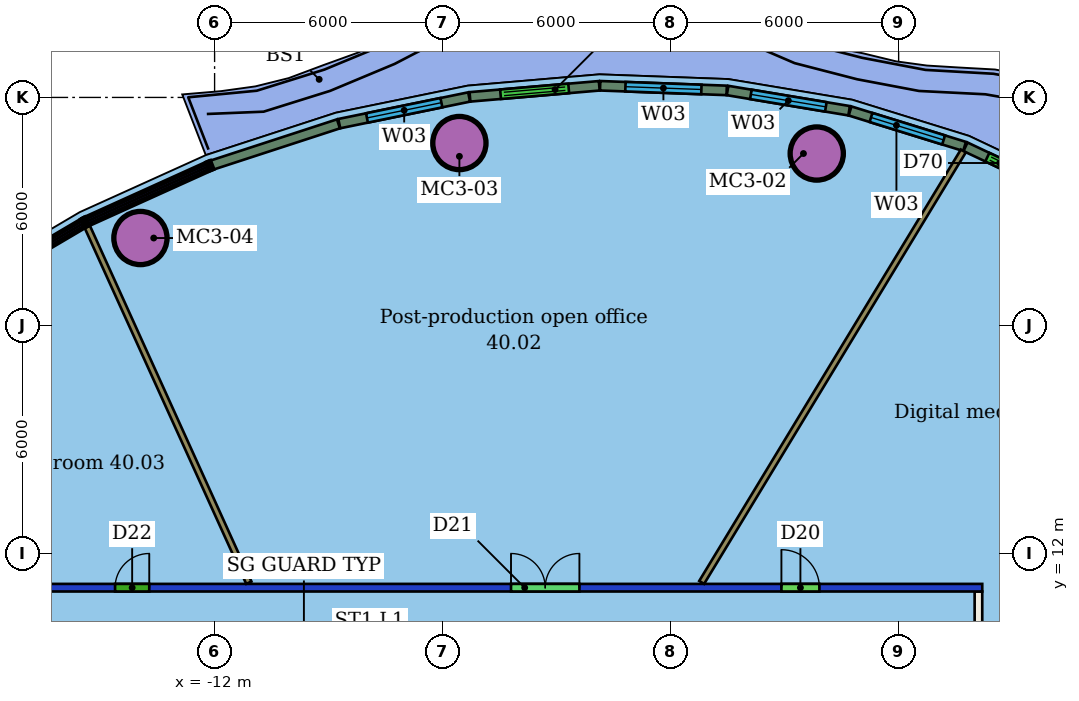
"""IFC4 building model, lengths in metres.
Left out: names, types, materials, properties, quantities, classifications, styles, units other than length and angle.
Written with IfcOpenShell. Run it as: python <this file> out.ifc"""

import sys

from ifc_helpers import new_model, si_unit, direction, frame, frame_2d, origin, origin_2d, place, context, subcontext, project, spatial, rectangle, hollow_circle, extrude, element, fill, save


model = new_model("IFC4")
c1 = context("Model", 3, precision=1e-05, world=origin(), true_north=direction((0.0, 1.0)))
c2 = subcontext(c1, "Body", "Model", "MODEL_VIEW")
j1 = project(units=[si_unit("LENGTHUNIT", "METRE"), si_unit("PLANEANGLEUNIT", "RADIAN")], contexts=[c1])
p1 = place(None, origin())
s1 = spatial("IfcSite", under=j1, at=p1, CompositionType="ELEMENT")
p2 = place(p1, origin())
s2 = spatial("IfcBuilding", under=s1, at=p2, CompositionType="ELEMENT")
p3 = place(p2, frame((0.0, 0.0, 168.6)))
s3 = spatial("IfcBuildingStorey", under=s2, at=p3, CompositionType="ELEMENT", Elevation=168.6)
for number, where, z_axis, x_axis in (
    (1, (3.845, 22.524, 0.0), (0.0, 0.0, 1.0), (1.0, 0.0, 0.0)),
    (2, (-5.558, 22.8, 0.0), (0.0, 0.0, 1.0), (1.0, 0.0, 0.0)),
    (3, (-13.952, 20.301, 0.0), (0.0, 0.0, 1.0), (1.0, 0.0, 0.0)),
):
    element("IfcColumn", number, at=place(p3, frame(where, z_axis=z_axis, x_axis=x_axis)), inside=s3, PredefinedType="COLUMN", context=c2, shape_type="SweptSolid", body=[
        extrude(hollow_circle(Radius=0.7, WallThickness=0.05, at=origin_2d()), origin(), (0.0, 0.0, 1.0), 3.45),
    ])
p4 = place(p3, frame((-20.2, 11.1, 0.0), z_axis=(0.0, 0.0, 1.0), x_axis=(1.0, 0.0, 0.0)))
e4 = element("IfcWall", 4, at=p4, inside=s3, PredefinedType="PARTITIONING", context=c2, shape_type="SweptSolid", body=[
    extrude(rectangle(XDim=28.4, YDim=0.2, at=frame_2d((14.2, 0.0))), origin(), (0.0, 0.0, 1.0), 3.05),
])
p5 = place(p4, frame((23.115, 0.0, 0.0)))
e5 = element("IfcOpeningElement", 5, at=p5, cuts=e4, PredefinedType="OPENING", context=c2, shape_type="SweptSolid", body=[
    extrude(rectangle(XDim=1.0, YDim=2.1, at=frame_2d((0.5, 1.05))), frame((0.0, 0.11, 0.0), z_axis=(0.0, -1.0, 0.0), x_axis=(1.0, 0.0, 0.0)), (0.0, 0.0, 1.0), 0.22),
])
p6 = place(p4, frame((16.0, 0.0, 0.0)))
e6 = element("IfcOpeningElement", 6, at=p6, cuts=e4, PredefinedType="OPENING", context=c2, shape_type="SweptSolid", body=[
    extrude(rectangle(XDim=1.8, YDim=2.1, at=frame_2d((0.9, 1.05))), frame((0.0, 0.11, 0.0), z_axis=(0.0, -1.0, 0.0), x_axis=(1.0, 0.0, 0.0)), (0.0, 0.0, 1.0), 0.22),
])
p7 = place(p4, frame((5.581, 0.0, 0.0)))
e7 = element("IfcOpeningElement", 7, at=p7, cuts=e4, PredefinedType="OPENING", context=c2, shape_type="SweptSolid", body=[
    extrude(rectangle(XDim=0.9, YDim=2.1, at=frame_2d((0.45, 1.05))), frame((0.0, 0.11, 0.0), z_axis=(0.0, -1.0, 0.0), x_axis=(1.0, 0.0, 0.0)), (0.0, 0.0, 1.0), 0.22),
])
p8 = place(p3, frame((8.1, 11.0, 0.0), z_axis=(0.0, 0.0, 1.0), x_axis=(0.0, -1.0, 0.0)))
e8 = element("IfcWall", 8, at=p8, inside=s3, PredefinedType="PARTITIONING", context=c2, shape_type="SweptSolid", body=[
    extrude(rectangle(XDim=22.0, YDim=0.2, at=frame_2d((11.0, 0.0))), origin(), (0.0, 0.0, 1.0), 3.45),
])
p9 = place(p8, frame((12.716, 0.0, 0.0)))
e9 = element("IfcOpeningElement", 9, at=p9, cuts=e8, PredefinedType="OPENING", context=c2, shape_type="SweptSolid", body=[
    extrude(rectangle(XDim=1.2, YDim=2.1, at=frame_2d((0.6, 1.05))), frame((0.0, 0.11, 0.0), z_axis=(0.0, -1.0, 0.0), x_axis=(1.0, 0.0, 0.0)), (0.0, 0.0, 1.0), 0.22),
])
p10 = place(p8, frame((5.725, 0.0, 0.0)))
e10 = element("IfcOpeningElement", 10, at=p10, cuts=e8, PredefinedType="OPENING", context=c2, shape_type="SweptSolid", body=[
    extrude(rectangle(XDim=1.1, YDim=2.1, at=frame_2d((0.55, 1.05))), frame((0.0, 0.11, 0.0), z_axis=(0.0, -1.0, 0.0), x_axis=(1.0, 0.0, 0.0)), (0.0, 0.0, 1.0), 0.22),
])
p11 = place(p3, frame((16.98, 15.268, 0.0), z_axis=(0.0, 0.0, 1.0), x_axis=(-0.832919781607, -0.553393745363, 0.0)))
e11 = element("IfcWall", 11, at=p11, inside=s3, PredefinedType="PARTITIONING", context=c2, shape_type="SweptSolid", body=[
    extrude(rectangle(XDim=10.442, YDim=0.3, at=frame_2d((5.221, 0.0))), origin(), (0.0, 0.0, 1.0), 3.45),
])
p12 = place(p3, frame((7.702, 22.59, 0.0), z_axis=(0.0, 0.0, 1.0), x_axis=(-0.518600423231, -0.855016725582, 0.0)))
e12 = element("IfcWall", 12, at=p12, inside=s3, PredefinedType="PARTITIONING", context=c2, shape_type="SweptSolid", body=[
    extrude(rectangle(XDim=13.276, YDim=0.15, at=frame_2d((6.638, 0.0))), origin(), (0.0, 0.0, 1.0), 3.45),
])
p13 = place(p3, frame((-15.354, 20.604, 0.0), z_axis=(0.0, 0.0, 1.0), x_axis=(0.413381174211, -0.910558073276, 0.0)))
e13 = element("IfcWall", 13, at=p13, inside=s3, PredefinedType="PARTITIONING", context=c2, shape_type="SweptSolid", body=[
    extrude(rectangle(XDim=10.293, YDim=0.15, at=frame_2d((5.147, 0.0))), origin(), (0.0, 0.0, 1.0), 3.45),
])
p14 = place(p3, frame((10.536, 21.385, 0.0), z_axis=(0.0, 0.0, 1.0), x_axis=(-0.903619724227, 0.428335609058, 0.0)))
e14 = element("IfcWall", 14, at=p14, inside=s3, PredefinedType="SOLIDWALL", context=c2, shape_type="SweptSolid", body=[
    extrude(rectangle(XDim=3.073, YDim=0.25, at=frame_2d((1.537, 0.0))), origin(), (0.0, 0.0, 1.0), 3.1),
])
p15 = place(p14, frame((0.637, 0.0, 0.0)))
e15 = element("IfcOpeningElement", 15, at=p15, cuts=e14, PredefinedType="OPENING", context=c2, shape_type="SweptSolid", body=[
    extrude(rectangle(XDim=1.8, YDim=2.4, at=frame_2d((0.9, 1.2))), frame((0.0, 0.135, 0.0), z_axis=(0.0, -1.0, 0.0), x_axis=(1.0, 0.0, 0.0)), (0.0, 0.0, 1.0), 0.27),
])
p16 = place(p3, frame((7.735, 22.711, 0.0), z_axis=(0.0, 0.0, 1.0), x_axis=(-0.955252052872, 0.295793028119, 0.0)))
e16 = element("IfcWall", 16, at=p16, inside=s3, PredefinedType="SOLIDWALL", context=c2, shape_type="SweptSolid", body=[
    extrude(rectangle(XDim=3.155, YDim=0.25, at=frame_2d((1.577, 0.0))), origin(), (0.0, 0.0, 1.0), 3.1),
])
p17 = place(p16, frame((0.577, 0.0, 0.9)))
e17 = element("IfcOpeningElement", 17, at=p17, cuts=e16, PredefinedType="OPENING", context=c2, shape_type="SweptSolid", body=[
    extrude(rectangle(XDim=2.0, YDim=2.1, at=frame_2d((1.0, 1.05))), frame((0.0, 0.135, 0.0), z_axis=(0.0, -1.0, 0.0), x_axis=(1.0, 0.0, 0.0)), (0.0, 0.0, 1.0), 0.27),
])
p18 = place(p3, frame((4.697, 23.65, 0.0), z_axis=(0.0, 0.0, 1.0), x_axis=(-0.986414264197, 0.164276898525, 0.0)))
e18 = element("IfcWall", 18, at=p18, inside=s3, PredefinedType="SOLIDWALL", context=c2, shape_type="SweptSolid", body=[
    extrude(rectangle(XDim=3.243, YDim=0.25, at=frame_2d((1.621, 0.0))), origin(), (0.0, 0.0, 1.0), 3.1),
])
p19 = place(p18, frame((0.621, 0.0, 0.9)))
e19 = element("IfcOpeningElement", 19, at=p19, cuts=e18, PredefinedType="OPENING", context=c2, shape_type="SweptSolid", body=[
    extrude(rectangle(XDim=2.0, YDim=2.1, at=frame_2d((1.0, 1.05))), frame((0.0, 0.135, 0.0), z_axis=(0.0, -1.0, 0.0), x_axis=(1.0, 0.0, 0.0)), (0.0, 0.0, 1.0), 0.27),
])
p20 = place(p3, frame((1.475, 24.185, 0.0), z_axis=(0.0, 0.0, 1.0), x_axis=(-0.999325831556, 0.036713517754, 0.0)))
e20 = element("IfcWall", 20, at=p20, inside=s3, PredefinedType="SOLIDWALL", context=c2, shape_type="SweptSolid", body=[
    extrude(rectangle(XDim=3.332, YDim=0.25, at=frame_2d((1.666, 0.0))), origin(), (0.0, 0.0, 1.0), 3.1),
])
p21 = place(p20, frame((0.666, 0.0, 0.9)))
e21 = element("IfcOpeningElement", 21, at=p21, cuts=e20, PredefinedType="OPENING", context=c2, shape_type="SweptSolid", body=[
    extrude(rectangle(XDim=2.0, YDim=2.1, at=frame_2d((1.0, 1.05))), frame((0.0, 0.135, 0.0), z_axis=(0.0, -1.0, 0.0), x_axis=(1.0, 0.0, 0.0)), (0.0, 0.0, 1.0), 0.27),
])
p22 = place(p3, frame((-1.878, 24.306, 0.0), z_axis=(0.0, 0.0, 1.0), x_axis=(-0.996350297924, -0.085358560359, 0.0)))
e22 = element("IfcWall", 22, at=p22, inside=s3, PredefinedType="SOLIDWALL", context=c2, shape_type="SweptSolid", body=[
    extrude(rectangle(XDim=3.415, YDim=0.25, at=frame_2d((1.708, 0.0))), origin(), (0.0, 0.0, 1.0), 3.1),
])
p23 = place(p22, frame((0.807, 0.0, 0.0)))
e23 = element("IfcOpeningElement", 23, at=p23, cuts=e22, PredefinedType="OPENING", context=c2, shape_type="SweptSolid", body=[
    extrude(rectangle(XDim=1.8, YDim=2.4, at=frame_2d((0.9, 1.2))), frame((0.0, 0.135, 0.0), z_axis=(0.0, -1.0, 0.0), x_axis=(1.0, 0.0, 0.0)), (0.0, 0.0, 1.0), 0.27),
])
p24 = place(p3, frame((-5.303, 24.012, 0.0), z_axis=(0.0, 0.0, 1.0), x_axis=(-0.979588567623, -0.201013029881, 0.0)))
e24 = element("IfcWall", 24, at=p24, inside=s3, PredefinedType="SOLIDWALL", context=c2, shape_type="SweptSolid", body=[
    extrude(rectangle(XDim=3.488, YDim=0.25, at=frame_2d((1.744, 0.0))), origin(), (0.0, 0.0, 1.0), 3.1),
])
p25 = place(p24, frame((0.744, 0.0, 0.9)))
e25 = element("IfcOpeningElement", 25, at=p25, cuts=e24, PredefinedType="OPENING", context=c2, shape_type="SweptSolid", body=[
    extrude(rectangle(XDim=2.0, YDim=2.1, at=frame_2d((1.0, 1.05))), frame((0.0, 0.135, 0.0), z_axis=(0.0, -1.0, 0.0), x_axis=(1.0, 0.0, 0.0)), (0.0, 0.0, 1.0), 0.27),
])
p26 = place(p3, frame((-8.741, 23.305, 0.0), z_axis=(0.0, 0.0, 1.0), x_axis=(-0.950740111952, -0.309989095817, 0.0)))
e26 = element("IfcWall", 26, at=p26, inside=s3, PredefinedType="SOLIDWALL", context=c2, shape_type="SweptSolid", body=[
    extrude(rectangle(XDim=3.502, YDim=0.25, at=frame_2d((1.751, 0.0))), origin(), (0.0, 0.0, 1.0), 3.1),
])
p27 = place(p5, origin())
e27 = element("IfcDoor", 27, at=p27, inside=s3, OperationType="SINGLE_SWING_LEFT", PredefinedType="DOOR", context=c2, shape_type="SweptSolid", body=[
    extrude(rectangle(XDim=1.0, YDim=2.1, at=frame_2d((0.5, 1.05))), frame((0.0, 0.025, 0.0), z_axis=(0.0, -1.0, 0.0), x_axis=(1.0, 0.0, 0.0)), (0.0, 0.0, 1.0), 0.05),
])
fill(e5, e27)
p28 = place(p6, origin())
e28 = element("IfcDoor", 28, at=p28, inside=s3, OperationType="DOUBLE_DOOR_SINGLE_SWING", PredefinedType="DOOR", context=c2, shape_type="SweptSolid", body=[
    extrude(rectangle(XDim=1.8, YDim=2.1, at=frame_2d((0.9, 1.05))), frame((0.0, 0.025, 0.0), z_axis=(0.0, -1.0, 0.0), x_axis=(1.0, 0.0, 0.0)), (0.0, 0.0, 1.0), 0.05),
])
fill(e6, e28)
p29 = place(p7, origin())
e29 = element("IfcDoor", 29, at=p29, inside=s3, OperationType="SINGLE_SWING_RIGHT", PredefinedType="DOOR", context=c2, shape_type="SweptSolid", body=[
    extrude(rectangle(XDim=0.9, YDim=2.1, at=frame_2d((0.45, 1.05))), frame((0.0, 0.025, 0.0), z_axis=(0.0, -1.0, 0.0), x_axis=(1.0, 0.0, 0.0)), (0.0, 0.0, 1.0), 0.05),
])
fill(e7, e29)
p30 = place(p15, origin())
e30 = element("IfcDoor", 30, at=p30, inside=s3, OperationType="DOUBLE_DOOR_SLIDING", PredefinedType="DOOR", context=c2, shape_type="SweptSolid", body=[
    extrude(rectangle(XDim=1.8, YDim=2.4, at=frame_2d((0.9, 1.2))), frame((0.0, 0.025, 0.0), z_axis=(0.0, -1.0, 0.0), x_axis=(1.0, 0.0, 0.0)), (0.0, 0.0, 1.0), 0.05),
])
fill(e15, e30)
p31 = place(p17, origin())
e31 = element("IfcWindow", 31, at=p31, inside=s3, PartitioningType="SINGLE_PANEL", PredefinedType="WINDOW", context=c2, shape_type="SweptSolid", body=[
    extrude(rectangle(XDim=2.0, YDim=2.1, at=frame_2d((1.0, 1.05))), frame((0.0, 0.03, 0.0), z_axis=(0.0, -1.0, 0.0), x_axis=(1.0, 0.0, 0.0)), (0.0, 0.0, 1.0), 0.06),
])
fill(e17, e31)
p32 = place(p19, origin())
e32 = element("IfcWindow", 32, at=p32, inside=s3, PartitioningType="SINGLE_PANEL", PredefinedType="WINDOW", context=c2, shape_type="SweptSolid", body=[
    extrude(rectangle(XDim=2.0, YDim=2.1, at=frame_2d((1.0, 1.05))), frame((0.0, 0.03, 0.0), z_axis=(0.0, -1.0, 0.0), x_axis=(1.0, 0.0, 0.0)), (0.0, 0.0, 1.0), 0.06),
])
fill(e19, e32)
p33 = place(p21, origin())
e33 = element("IfcWindow", 33, at=p33, inside=s3, PartitioningType="SINGLE_PANEL", PredefinedType="WINDOW", context=c2, shape_type="SweptSolid", body=[
    extrude(rectangle(XDim=2.0, YDim=2.1, at=frame_2d((1.0, 1.05))), frame((0.0, 0.03, 0.0), z_axis=(0.0, -1.0, 0.0), x_axis=(1.0, 0.0, 0.0)), (0.0, 0.0, 1.0), 0.06),
])
fill(e21, e33)
p34 = place(p23, origin())
e34 = element("IfcDoor", 34, at=p34, inside=s3, OperationType="DOUBLE_DOOR_SLIDING", PredefinedType="DOOR", context=c2, shape_type="SweptSolid", body=[
    extrude(rectangle(XDim=1.8, YDim=2.4, at=frame_2d((0.9, 1.2))), frame((0.0, 0.025, 0.0), z_axis=(0.0, -1.0, 0.0), x_axis=(1.0, 0.0, 0.0)), (0.0, 0.0, 1.0), 0.05),
])
fill(e23, e34)
p35 = place(p25, origin())
e35 = element("IfcWindow", 35, at=p35, inside=s3, PartitioningType="SINGLE_PANEL", PredefinedType="WINDOW", context=c2, shape_type="SweptSolid", body=[
    extrude(rectangle(XDim=2.0, YDim=2.1, at=frame_2d((1.0, 1.05))), frame((0.0, 0.03, 0.0), z_axis=(0.0, -1.0, 0.0), x_axis=(1.0, 0.0, 0.0)), (0.0, 0.0, 1.0), 0.06),
])
fill(e25, e35)
save(model, sys.argv[1])
